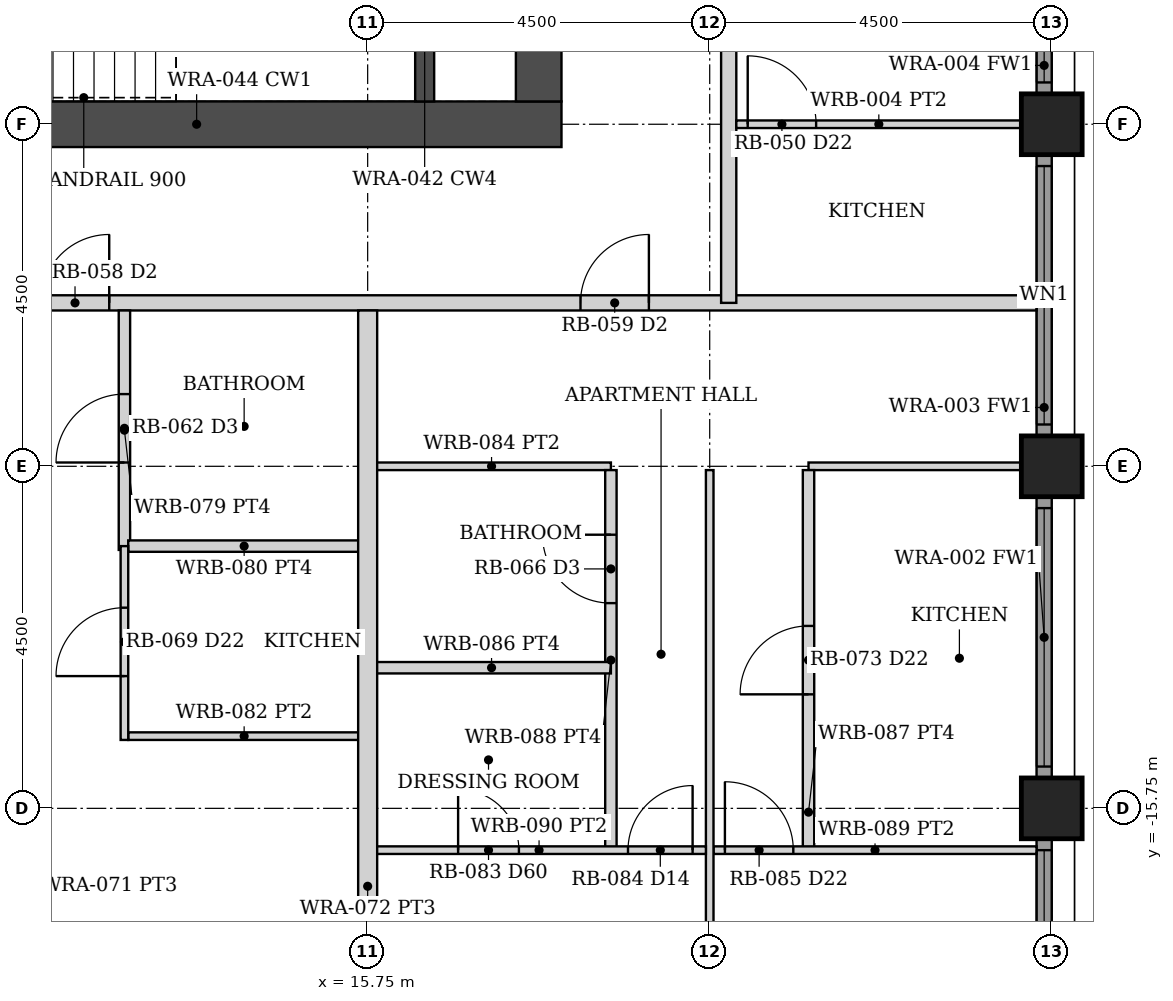
"""IFC4 building model, lengths in metres.
Left out: names, types, materials, properties, quantities, classifications, styles, units other than length and angle.
Written with IfcOpenShell. Run it as: python <this file> out.ifc"""

import sys

from ifc_helpers import new_model, si_unit, direction, frame, frame_2d, origin, origin_2d, place, context, subcontext, project, spatial, rectangle, hollow_rectangle, extrude, element, fill, save


model = new_model("IFC4")
c1 = context("Model", 3, precision=1e-05, world=origin(), true_north=direction((0.0, 1.0)))
c2 = subcontext(c1, "Body", "Model", "MODEL_VIEW")
j1 = project(units=[si_unit("LENGTHUNIT", "METRE"), si_unit("PLANEANGLEUNIT", "RADIAN")], contexts=[c1])
p1 = place(None, origin())
s1 = spatial("IfcSite", under=j1, at=p1, CompositionType="ELEMENT")
p2 = place(p1, origin())
s2 = spatial("IfcBuilding", under=s1, at=p2, CompositionType="ELEMENT")
p3 = place(p2, frame((0.0, 0.0, 37.0)))
s3 = spatial("IfcBuildingStorey", under=s2, at=p3, CompositionType="ELEMENT", Elevation=37.0)
for number, where, z_axis, x_axis in (
    (1, (24.75, -15.75, 0.0), (0.0, 0.0, 1.0), (1.0, 0.0, 0.0)),
    (2, (24.75, -11.25, 0.0), (0.0, 0.0, 1.0), (1.0, 0.0, 0.0)),
    (3, (24.75, -6.75, 0.0), (0.0, 0.0, 1.0), (1.0, 0.0, 0.0)),
):
    element("IfcColumn", number, at=place(p3, frame(where, z_axis=z_axis, x_axis=x_axis)), inside=s3, PredefinedType="COLUMN", context=c2, shape_type="SweptSolid", body=[
        extrude(hollow_rectangle(XDim=0.8, YDim=0.8, WallThickness=0.07, at=origin_2d()), origin(), (0.0, 0.0, 1.0), 3.5),
    ])
p4 = place(p3, frame((8.7, -6.75, 0.0), z_axis=(0.0, 0.0, 1.0), x_axis=(1.0, 0.0, 0.0)))
e4 = element("IfcWall", 4, at=p4, inside=s3, PredefinedType="SHEAR", context=c2, shape_type="SweptSolid", body=[
    extrude(rectangle(XDim=9.6, YDim=0.6, at=frame_2d((4.8, 0.0))), origin(), (0.0, 0.0, 1.0), 3.5),
])
p5 = place(p3, frame((18.0, -6.45, 0.0), z_axis=(0.0, 0.0, 1.0), x_axis=(0.0, 1.0, 0.0)))
e5 = element("IfcWall", 5, at=p5, inside=s3, PredefinedType="SHEAR", context=c2, shape_type="SweptSolid", body=[
    extrude(rectangle(XDim=12.9, YDim=0.6, at=frame_2d((6.45, 0.0))), origin(), (0.0, 0.0, 1.0), 3.5),
])
p6 = place(p3, frame((16.5, -6.45, 0.0), z_axis=(0.0, 0.0, 1.0), x_axis=(0.0, 1.0, 0.0)))
e6 = element("IfcWall", 6, at=p6, inside=s3, PredefinedType="SHEAR", context=c2, shape_type="SweptSolid", body=[
    extrude(rectangle(XDim=3.125, YDim=0.25, at=frame_2d((1.562, 0.0))), origin(), (0.0, 0.0, 1.0), 3.5),
])
p7 = place(p3, frame((24.65, -19.845, 0.0), z_axis=(0.0, 0.0, 1.0), x_axis=(0.0, 1.0, 0.0)))
e7 = element("IfcWall", 7, at=p7, inside=s3, PredefinedType="SOLIDWALL", context=c2, shape_type="SweptSolid", body=[
    extrude(rectangle(XDim=3.69, YDim=0.2, at=frame_2d((1.845, 0.0))), origin(), (0.0, 0.0, 1.0), 2.379),
])
p8 = place(p7, frame((0.145, 0.0, 0.3)))
e8 = element("IfcOpeningElement", 8, at=p8, cuts=e7, PredefinedType="OPENING", context=c2, shape_type="SweptSolid", body=[
    extrude(rectangle(XDim=3.4, YDim=1.929, at=frame_2d((1.7, 0.964))), frame((0.0, 0.11, 0.0), z_axis=(0.0, -1.0, 0.0), x_axis=(1.0, 0.0, 0.0)), (0.0, 0.0, 1.0), 0.22),
])
p9 = place(p3, frame((24.65, -15.345, 0.0), z_axis=(0.0, 0.0, 1.0), x_axis=(0.0, 1.0, 0.0)))
e9 = element("IfcWall", 9, at=p9, inside=s3, PredefinedType="SOLIDWALL", context=c2, shape_type="SweptSolid", body=[
    extrude(rectangle(XDim=3.69, YDim=0.2, at=frame_2d((1.845, 0.0))), origin(), (0.0, 0.0, 1.0), 2.379),
])
p10 = place(p9, frame((0.145, 0.0, 0.3)))
e10 = element("IfcOpeningElement", 10, at=p10, cuts=e9, PredefinedType="OPENING", context=c2, shape_type="SweptSolid", body=[
    extrude(rectangle(XDim=3.4, YDim=1.929, at=frame_2d((1.7, 0.964))), frame((0.0, 0.11, 0.0), z_axis=(0.0, -1.0, 0.0), x_axis=(1.0, 0.0, 0.0)), (0.0, 0.0, 1.0), 0.22),
])
p11 = place(p3, frame((24.65, -10.845, 0.0), z_axis=(0.0, 0.0, 1.0), x_axis=(0.0, 1.0, 0.0)))
e11 = element("IfcWall", 11, at=p11, inside=s3, PredefinedType="SOLIDWALL", context=c2, shape_type="SweptSolid", body=[
    extrude(rectangle(XDim=3.69, YDim=0.2, at=frame_2d((1.845, 0.0))), origin(), (0.0, 0.0, 1.0), 2.379),
])
p12 = place(p11, frame((0.145, 0.0, 0.3)))
e12 = element("IfcOpeningElement", 12, at=p12, cuts=e11, PredefinedType="OPENING", context=c2, shape_type="SweptSolid", body=[
    extrude(rectangle(XDim=3.4, YDim=1.929, at=frame_2d((1.7, 0.964))), frame((0.0, 0.11, 0.0), z_axis=(0.0, -1.0, 0.0), x_axis=(1.0, 0.0, 0.0)), (0.0, 0.0, 1.0), 0.22),
])
p13 = place(p3, frame((24.65, -6.345, 0.0), z_axis=(0.0, 0.0, 1.0), x_axis=(0.0, 1.0, 0.0)))
e13 = element("IfcWall", 13, at=p13, inside=s3, PredefinedType="SOLIDWALL", context=c2, shape_type="SweptSolid", body=[
    extrude(rectangle(XDim=3.69, YDim=0.2, at=frame_2d((1.845, 0.0))), origin(), (0.0, 0.0, 1.0), 2.379),
])
p14 = place(p13, frame((0.145, 0.0, 0.3)))
e14 = element("IfcOpeningElement", 14, at=p14, cuts=e13, PredefinedType="OPENING", context=c2, shape_type="SweptSolid", body=[
    extrude(rectangle(XDim=3.4, YDim=1.929, at=frame_2d((1.7, 0.964))), frame((0.0, 0.11, 0.0), z_axis=(0.0, -1.0, 0.0), x_axis=(1.0, 0.0, 0.0)), (0.0, 0.0, 1.0), 0.22),
])
p15 = place(p3, frame((-24.55, -9.1, 0.0), z_axis=(0.0, 0.0, 1.0), x_axis=(1.0, 0.0, 0.0)))
e15 = element("IfcWall", 15, at=p15, inside=s3, PredefinedType="PARTITIONING", context=c2, shape_type="SweptSolid", body=[
    extrude(rectangle(XDim=49.1, YDim=0.2, at=frame_2d((24.55, 0.0))), origin(), (0.0, 0.0, 1.0), 2.373),
])
p16 = place(p15, frame((5.1, 0.0, 0.0)))
e16 = element("IfcOpeningElement", 16, at=p16, cuts=e15, PredefinedType="OPENING", context=c2, shape_type="SweptSolid", body=[
    extrude(rectangle(XDim=0.9, YDim=2.1, at=frame_2d((0.45, 1.05))), frame((0.0, 0.11, 0.0), z_axis=(0.0, -1.0, 0.0), x_axis=(1.0, 0.0, 0.0)), (0.0, 0.0, 1.0), 0.22),
])
p17 = place(p15, frame((9.0, 0.0, 0.0)))
e17 = element("IfcOpeningElement", 17, at=p17, cuts=e15, PredefinedType="OPENING", context=c2, shape_type="SweptSolid", body=[
    extrude(rectangle(XDim=0.9, YDim=2.1, at=frame_2d((0.45, 1.05))), frame((0.0, 0.11, 0.0), z_axis=(0.0, -1.0, 0.0), x_axis=(1.0, 0.0, 0.0)), (0.0, 0.0, 1.0), 0.22),
])
p18 = place(p15, frame((18.1, 0.0, 0.0)))
e18 = element("IfcOpeningElement", 18, at=p18, cuts=e15, PredefinedType="OPENING", context=c2, shape_type="SweptSolid", body=[
    extrude(rectangle(XDim=0.9, YDim=2.1, at=frame_2d((0.45, 1.05))), frame((0.0, 0.11, 0.0), z_axis=(0.0, -1.0, 0.0), x_axis=(1.0, 0.0, 0.0)), (0.0, 0.0, 1.0), 0.22),
])
p19 = place(p15, frame((22.5, 0.0, 0.0)))
e19 = element("IfcOpeningElement", 19, at=p19, cuts=e15, PredefinedType="OPENING", context=c2, shape_type="SweptSolid", body=[
    extrude(rectangle(XDim=0.9, YDim=2.1, at=frame_2d((0.45, 1.05))), frame((0.0, 0.11, 0.0), z_axis=(0.0, -1.0, 0.0), x_axis=(1.0, 0.0, 0.0)), (0.0, 0.0, 1.0), 0.22),
])
p20 = place(p15, frame((27.1, 0.0, 0.0)))
e20 = element("IfcOpeningElement", 20, at=p20, cuts=e15, PredefinedType="OPENING", context=c2, shape_type="SweptSolid", body=[
    extrude(rectangle(XDim=0.9, YDim=2.1, at=frame_2d((0.45, 1.05))), frame((0.0, 0.11, 0.0), z_axis=(0.0, -1.0, 0.0), x_axis=(1.0, 0.0, 0.0)), (0.0, 0.0, 1.0), 0.22),
])
p21 = place(p15, frame((36.0, 0.0, 0.0)))
e21 = element("IfcOpeningElement", 21, at=p21, cuts=e15, PredefinedType="OPENING", context=c2, shape_type="SweptSolid", body=[
    extrude(rectangle(XDim=0.9, YDim=2.1, at=frame_2d((0.45, 1.05))), frame((0.0, 0.11, 0.0), z_axis=(0.0, -1.0, 0.0), x_axis=(1.0, 0.0, 0.0)), (0.0, 0.0, 1.0), 0.22),
])
p22 = place(p15, frame((43.1, 0.0, 0.0)))
e22 = element("IfcOpeningElement", 22, at=p22, cuts=e15, PredefinedType="OPENING", context=c2, shape_type="SweptSolid", body=[
    extrude(rectangle(XDim=0.9, YDim=2.1, at=frame_2d((0.45, 1.05))), frame((0.0, 0.11, 0.0), z_axis=(0.0, -1.0, 0.0), x_axis=(1.0, 0.0, 0.0)), (0.0, 0.0, 1.0), 0.22),
])
p23 = place(p3, frame((20.5, -9.1, 0.0), z_axis=(0.0, 0.0, 1.0), x_axis=(0.0, 1.0, 0.0)))
e23 = element("IfcWall", 23, at=p23, inside=s3, PredefinedType="PARTITIONING", context=c2, shape_type="SweptSolid", body=[
    extrude(rectangle(XDim=18.2, YDim=0.2, at=frame_2d((9.1, 0.0))), origin(), (0.0, 0.0, 1.0), 2.373),
])
p24 = place(p23, frame((6.4, 0.0, 0.0)))
e24 = element("IfcOpeningElement", 24, at=p24, cuts=e23, PredefinedType="OPENING", context=c2, shape_type="SweptSolid", body=[
    extrude(rectangle(XDim=0.9, YDim=2.1, at=frame_2d((0.45, 1.05))), frame((0.0, 0.11, 0.0), z_axis=(0.0, -1.0, 0.0), x_axis=(1.0, 0.0, 0.0)), (0.0, 0.0, 1.0), 0.22),
])
p25 = place(p3, frame((12.55, -12.35, 0.0), z_axis=(0.0, 0.0, 1.0), x_axis=(0.0, 1.0, 0.0)))
e25 = element("IfcWall", 25, at=p25, inside=s3, PredefinedType="PARTITIONING", context=c2, shape_type="SweptSolid", body=[
    extrude(rectangle(XDim=3.15, YDim=0.15, at=frame_2d((1.575, 0.0))), origin(), (0.0, 0.0, 1.0), 2.373),
])
p26 = place(p25, frame((1.15, 0.0, 0.0)))
e26 = element("IfcOpeningElement", 26, at=p26, cuts=e25, PredefinedType="OPENING", context=c2, shape_type="SweptSolid", body=[
    extrude(rectangle(XDim=0.9, YDim=2.1, at=frame_2d((0.45, 1.05))), frame((0.0, 0.085, 0.0), z_axis=(0.0, -1.0, 0.0), x_axis=(1.0, 0.0, 0.0)), (0.0, 0.0, 1.0), 0.17),
])
p27 = place(p3, frame((12.6, -12.3, 0.0), z_axis=(0.0, 0.0, 1.0), x_axis=(1.0, 0.0, 0.0)))
e27 = element("IfcWall", 27, at=p27, inside=s3, PredefinedType="PARTITIONING", context=c2, shape_type="SweptSolid", body=[
    extrude(rectangle(XDim=3.05, YDim=0.15, at=frame_2d((1.525, 0.0))), origin(), (0.0, 0.0, 1.0), 2.373),
])
p28 = place(p3, frame((12.6, -14.8, 0.0), z_axis=(0.0, 0.0, 1.0), x_axis=(1.0, 0.0, 0.0)))
e28 = element("IfcWall", 28, at=p28, inside=s3, PredefinedType="PARTITIONING", context=c2, shape_type="SweptSolid", body=[
    extrude(rectangle(XDim=3.05, YDim=0.1, at=frame_2d((1.525, 0.0))), origin(), (0.0, 0.0, 1.0), 2.373),
])
p29 = place(p3, frame((12.55, -14.85, 0.0), z_axis=(0.0, 0.0, 1.0), x_axis=(0.0, 1.0, 0.0)))
e29 = element("IfcWall", 29, at=p29, inside=s3, PredefinedType="PARTITIONING", context=c2, shape_type="SweptSolid", body=[
    extrude(rectangle(XDim=2.55, YDim=0.1, at=frame_2d((1.275, 0.0))), origin(), (0.0, 0.0, 1.0), 2.373),
])
p30 = place(p29, frame((0.84, 0.0, 0.0)))
e30 = element("IfcOpeningElement", 30, at=p30, cuts=e29, PredefinedType="OPENING", context=c2, shape_type="SweptSolid", body=[
    extrude(rectangle(XDim=0.9, YDim=2.1, at=frame_2d((0.45, 1.05))), frame((0.0, 0.06, 0.0), z_axis=(0.0, -1.0, 0.0), x_axis=(1.0, 0.0, 0.0)), (0.0, 0.0, 1.0), 0.12),
])
p31 = place(p3, frame((21.55, -11.25, 0.0), z_axis=(0.0, 0.0, 1.0), x_axis=(1.0, 0.0, 0.0)))
e31 = element("IfcWall", 31, at=p31, inside=s3, PredefinedType="PARTITIONING", context=c2, shape_type="SweptSolid", body=[
    extrude(rectangle(XDim=2.8, YDim=0.1, at=frame_2d((1.4, 0.0))), origin(), (0.0, 0.0, 1.0), 2.373),
])
p32 = place(p3, frame((21.55, -16.3, 0.0), z_axis=(0.0, 0.0, 1.0), x_axis=(0.0, 1.0, 0.0)))
e32 = element("IfcWall", 32, at=p32, inside=s3, PredefinedType="PARTITIONING", context=c2, shape_type="SweptSolid", body=[
    extrude(rectangle(XDim=5.0, YDim=0.15, at=frame_2d((2.5, 0.0))), origin(), (0.0, 0.0, 1.0), 2.373),
])
p33 = place(p32, frame((2.05, 0.0, 0.0)))
e33 = element("IfcOpeningElement", 33, at=p33, cuts=e32, PredefinedType="OPENING", context=c2, shape_type="SweptSolid", body=[
    extrude(rectangle(XDim=0.9, YDim=2.1, at=frame_2d((0.45, 1.05))), frame((0.0, 0.085, 0.0), z_axis=(0.0, -1.0, 0.0), x_axis=(1.0, 0.0, 0.0)), (0.0, 0.0, 1.0), 0.17),
])
p34 = place(p3, frame((20.3, -16.3, 0.0), z_axis=(0.0, 0.0, 1.0), x_axis=(1.0, 0.0, 0.0)))
e34 = element("IfcWall", 34, at=p34, inside=s3, PredefinedType="PARTITIONING", context=c2, shape_type="SweptSolid", body=[
    extrude(rectangle(XDim=4.25, YDim=0.1, at=frame_2d((2.125, 0.0))), origin(), (0.0, 0.0, 1.0), 2.373),
])
p35 = place(p34, frame((0.15, 0.0, 0.0)))
e35 = element("IfcOpeningElement", 35, at=p35, cuts=e34, PredefinedType="OPENING", context=c2, shape_type="SweptSolid", body=[
    extrude(rectangle(XDim=0.9, YDim=2.1, at=frame_2d((0.45, 1.05))), frame((0.0, 0.06, 0.0), z_axis=(0.0, -1.0, 0.0), x_axis=(1.0, 0.0, 0.0)), (0.0, 0.0, 1.0), 0.12),
])
p36 = place(p3, frame((20.25, -24.35, 0.0), z_axis=(0.0, 0.0, 1.0), x_axis=(0.0, 1.0, 0.0)))
e36 = element("IfcWall", 36, at=p36, inside=s3, PredefinedType="PARTITIONING", context=c2, shape_type="SweptSolid", body=[
    extrude(rectangle(XDim=13.05, YDim=0.1, at=frame_2d((6.525, 0.0))), origin(), (0.0, 0.0, 1.0), 2.373),
])
p37 = place(p3, frame((15.81, -11.25, 0.0), z_axis=(0.0, 0.0, 1.0), x_axis=(1.0, 0.0, 0.0)))
e37 = element("IfcWall", 37, at=p37, inside=s3, PredefinedType="PARTITIONING", context=c2, shape_type="SweptSolid", body=[
    extrude(rectangle(XDim=3.14, YDim=0.1, at=frame_2d((1.57, 0.0))), origin(), (0.0, 0.0, 1.0), 2.373),
])
p38 = place(p3, frame((18.95, -16.3, 0.0), z_axis=(0.0, 0.0, 1.0), x_axis=(0.0, 1.0, 0.0)))
e38 = element("IfcWall", 38, at=p38, inside=s3, PredefinedType="PARTITIONING", context=c2, shape_type="SweptSolid", body=[
    extrude(rectangle(XDim=5.0, YDim=0.15, at=frame_2d((2.5, 0.0))), origin(), (0.0, 0.0, 1.0), 2.373),
])
p39 = place(p38, frame((3.25, 0.0, 0.0)))
e39 = element("IfcOpeningElement", 39, at=p39, cuts=e38, PredefinedType="OPENING", context=c2, shape_type="SweptSolid", body=[
    extrude(rectangle(XDim=0.9, YDim=2.1, at=frame_2d((0.45, 1.05))), frame((0.0, 0.085, 0.0), z_axis=(0.0, -1.0, 0.0), x_axis=(1.0, 0.0, 0.0)), (0.0, 0.0, 1.0), 0.17),
])
p40 = place(p3, frame((15.81, -16.3, 0.0), z_axis=(0.0, 0.0, 1.0), x_axis=(1.0, 0.0, 0.0)))
e40 = element("IfcWall", 40, at=p40, inside=s3, PredefinedType="PARTITIONING", context=c2, shape_type="SweptSolid", body=[
    extrude(rectangle(XDim=4.39, YDim=0.1, at=frame_2d((2.195, 0.0))), origin(), (0.0, 0.0, 1.0), 2.373),
])
p41 = place(p40, frame((3.365, 0.0, 0.0)))
e41 = element("IfcOpeningElement", 41, at=p41, cuts=e40, PredefinedType="OPENING", context=c2, shape_type="SweptSolid", body=[
    extrude(rectangle(XDim=0.85, YDim=2.1, at=frame_2d((0.425, 1.05))), frame((0.0, 0.06, 0.0), z_axis=(0.0, -1.0, 0.0), x_axis=(1.0, 0.0, 0.0)), (0.0, 0.0, 1.0), 0.12),
])
p42 = place(p40, frame((1.13, 0.0, 0.0)))
e42 = element("IfcOpeningElement", 42, at=p42, cuts=e40, PredefinedType="OPENING", context=c2, shape_type="SweptSolid", body=[
    extrude(rectangle(XDim=0.8, YDim=2.1, at=frame_2d((0.4, 1.05))), frame((0.0, 0.06, 0.0), z_axis=(0.0, -1.0, 0.0), x_axis=(1.0, 0.0, 0.0)), (0.0, 0.0, 1.0), 0.12),
])
p43 = place(p3, frame((15.81, -13.9, 0.0), z_axis=(0.0, 0.0, 1.0), x_axis=(1.0, 0.0, 0.0)))
e43 = element("IfcWall", 43, at=p43, inside=s3, PredefinedType="PARTITIONING", context=c2, shape_type="SweptSolid", body=[
    extrude(rectangle(XDim=3.14, YDim=0.15, at=frame_2d((1.57, 0.0))), origin(), (0.0, 0.0, 1.0), 2.373),
])
p44 = place(p3, frame((15.75, -24.35, 0.0), z_axis=(0.0, 0.0, 1.0), x_axis=(0.0, 1.0, 0.0)))
e44 = element("IfcWall", 44, at=p44, inside=s3, PredefinedType="PARTITIONING", context=c2, shape_type="SweptSolid", body=[
    extrude(rectangle(XDim=15.15, YDim=0.25, at=frame_2d((7.575, 0.0))), origin(), (0.0, 0.0, 1.0), 2.373),
])
p45 = place(p3, frame((20.6, -6.75, 0.0), z_axis=(0.0, 0.0, 1.0), x_axis=(1.0, 0.0, 0.0)))
e45 = element("IfcWall", 45, at=p45, inside=s3, PredefinedType="PARTITIONING", context=c2, shape_type="SweptSolid", body=[
    extrude(rectangle(XDim=3.75, YDim=0.1, at=frame_2d((1.875, 0.0))), origin(), (0.0, 0.0, 1.0), 2.373),
])
p46 = place(p45, frame((0.15, 0.0, 0.0)))
e46 = element("IfcOpeningElement", 46, at=p46, cuts=e45, PredefinedType="OPENING", context=c2, shape_type="SweptSolid", body=[
    extrude(rectangle(XDim=0.9, YDim=2.1, at=frame_2d((0.45, 1.05))), frame((0.0, 0.06, 0.0), z_axis=(0.0, -1.0, 0.0), x_axis=(1.0, 0.0, 0.0)), (0.0, 0.0, 1.0), 0.12),
])
p47 = place(p8, origin())
e47 = element("IfcWindow", 47, at=p47, inside=s3, PartitioningType="SINGLE_PANEL", PredefinedType="WINDOW", context=c2, shape_type="SweptSolid", body=[
    extrude(rectangle(XDim=3.4, YDim=1.929, at=frame_2d((1.7, 0.964))), frame((0.0, 0.03, 0.0), z_axis=(0.0, -1.0, 0.0), x_axis=(1.0, 0.0, 0.0)), (0.0, 0.0, 1.0), 0.06),
])
fill(e8, e47)
p48 = place(p10, origin())
e48 = element("IfcWindow", 48, at=p48, inside=s3, PartitioningType="SINGLE_PANEL", PredefinedType="WINDOW", context=c2, shape_type="SweptSolid", body=[
    extrude(rectangle(XDim=3.4, YDim=1.929, at=frame_2d((1.7, 0.964))), frame((0.0, 0.03, 0.0), z_axis=(0.0, -1.0, 0.0), x_axis=(1.0, 0.0, 0.0)), (0.0, 0.0, 1.0), 0.06),
])
fill(e10, e48)
p49 = place(p12, origin())
e49 = element("IfcWindow", 49, at=p49, inside=s3, PartitioningType="SINGLE_PANEL", PredefinedType="WINDOW", context=c2, shape_type="SweptSolid", body=[
    extrude(rectangle(XDim=3.4, YDim=1.929, at=frame_2d((1.7, 0.964))), frame((0.0, 0.03, 0.0), z_axis=(0.0, -1.0, 0.0), x_axis=(1.0, 0.0, 0.0)), (0.0, 0.0, 1.0), 0.06),
])
fill(e12, e49)
p50 = place(p14, origin())
e50 = element("IfcWindow", 50, at=p50, inside=s3, PartitioningType="SINGLE_PANEL", PredefinedType="WINDOW", context=c2, shape_type="SweptSolid", body=[
    extrude(rectangle(XDim=3.4, YDim=1.929, at=frame_2d((1.7, 0.964))), frame((0.0, 0.03, 0.0), z_axis=(0.0, -1.0, 0.0), x_axis=(1.0, 0.0, 0.0)), (0.0, 0.0, 1.0), 0.06),
])
fill(e14, e50)
p51 = place(p21, origin())
e51 = element("IfcDoor", 51, at=p51, inside=s3, OperationType="SINGLE_SWING_RIGHT", PredefinedType="DOOR", context=c2, shape_type="SweptSolid", body=[
    extrude(rectangle(XDim=0.9, YDim=2.1, at=frame_2d((0.45, 1.05))), frame((0.0, 0.025, 0.0), z_axis=(0.0, -1.0, 0.0), x_axis=(1.0, 0.0, 0.0)), (0.0, 0.0, 1.0), 0.05),
])
fill(e21, e51)
p52 = place(p26, origin())
e52 = element("IfcDoor", 52, at=p52, inside=s3, OperationType="SINGLE_SWING_LEFT", PredefinedType="DOOR", context=c2, shape_type="SweptSolid", body=[
    extrude(rectangle(XDim=0.9, YDim=2.1, at=frame_2d((0.45, 1.05))), frame((0.0, 0.025, 0.0), z_axis=(0.0, -1.0, 0.0), x_axis=(1.0, 0.0, 0.0)), (0.0, 0.0, 1.0), 0.05),
])
fill(e26, e52)
p53 = place(p30, origin())
e53 = element("IfcDoor", 53, at=p53, inside=s3, OperationType="SINGLE_SWING_LEFT", PredefinedType="DOOR", context=c2, shape_type="SweptSolid", body=[
    extrude(rectangle(XDim=0.9, YDim=2.1, at=frame_2d((0.45, 1.05))), frame((0.0, 0.025, 0.0), z_axis=(0.0, -1.0, 0.0), x_axis=(1.0, 0.0, 0.0)), (0.0, 0.0, 1.0), 0.05),
])
fill(e30, e53)
p54 = place(p22, origin())
e54 = element("IfcDoor", 54, at=p54, inside=s3, OperationType="SINGLE_SWING_RIGHT", PredefinedType="DOOR", context=c2, shape_type="SweptSolid", body=[
    extrude(rectangle(XDim=0.9, YDim=2.1, at=frame_2d((0.45, 1.05))), frame((0.0, 0.025, 0.0), z_axis=(0.0, -1.0, 0.0), x_axis=(1.0, 0.0, 0.0)), (0.0, 0.0, 1.0), 0.05),
])
fill(e22, e54)
p55 = place(p33, origin())
e55 = element("IfcDoor", 55, at=p55, inside=s3, OperationType="SINGLE_SWING_LEFT", PredefinedType="DOOR", context=c2, shape_type="SweptSolid", body=[
    extrude(rectangle(XDim=0.9, YDim=2.1, at=frame_2d((0.45, 1.05))), frame((0.0, 0.025, 0.0), z_axis=(0.0, -1.0, 0.0), x_axis=(1.0, 0.0, 0.0)), (0.0, 0.0, 1.0), 0.05),
])
fill(e33, e55)
p56 = place(p35, origin())
e56 = element("IfcDoor", 56, at=p56, inside=s3, OperationType="SINGLE_SWING_LEFT", PredefinedType="DOOR", context=c2, shape_type="SweptSolid", body=[
    extrude(rectangle(XDim=0.9, YDim=2.1, at=frame_2d((0.45, 1.05))), frame((0.0, 0.025, 0.0), z_axis=(0.0, -1.0, 0.0), x_axis=(1.0, 0.0, 0.0)), (0.0, 0.0, 1.0), 0.05),
])
fill(e35, e56)
p57 = place(p41, origin())
e57 = element("IfcDoor", 57, at=p57, inside=s3, OperationType="SINGLE_SWING_RIGHT", PredefinedType="DOOR", context=c2, shape_type="SweptSolid", body=[
    extrude(rectangle(XDim=0.85, YDim=2.1, at=frame_2d((0.425, 1.05))), frame((0.0, 0.025, 0.0), z_axis=(0.0, -1.0, 0.0), x_axis=(1.0, 0.0, 0.0)), (0.0, 0.0, 1.0), 0.05),
])
fill(e41, e57)
p58 = place(p39, origin())
e58 = element("IfcDoor", 58, at=p58, inside=s3, OperationType="SINGLE_SWING_RIGHT", PredefinedType="DOOR", context=c2, shape_type="SweptSolid", body=[
    extrude(rectangle(XDim=0.9, YDim=2.1, at=frame_2d((0.45, 1.05))), frame((0.0, 0.025, 0.0), z_axis=(0.0, -1.0, 0.0), x_axis=(1.0, 0.0, 0.0)), (0.0, 0.0, 1.0), 0.05),
])
fill(e39, e58)
p59 = place(p42, origin())
e59 = element("IfcDoor", 59, at=p59, inside=s3, OperationType="SINGLE_SWING_LEFT", PredefinedType="DOOR", context=c2, shape_type="SweptSolid", body=[
    extrude(rectangle(XDim=0.8, YDim=2.1, at=frame_2d((0.4, 1.05))), frame((0.0, 0.025, 0.0), z_axis=(0.0, -1.0, 0.0), x_axis=(1.0, 0.0, 0.0)), (0.0, 0.0, 1.0), 0.05),
])
fill(e42, e59)
p60 = place(p46, origin())
e60 = element("IfcDoor", 60, at=p60, inside=s3, OperationType="SINGLE_SWING_LEFT", PredefinedType="DOOR", context=c2, shape_type="SweptSolid", body=[
    extrude(rectangle(XDim=0.9, YDim=2.1, at=frame_2d((0.45, 1.05))), frame((0.0, 0.025, 0.0), z_axis=(0.0, -1.0, 0.0), x_axis=(1.0, 0.0, 0.0)), (0.0, 0.0, 1.0), 0.05),
])
fill(e46, e60)
save(model, sys.argv[1])
